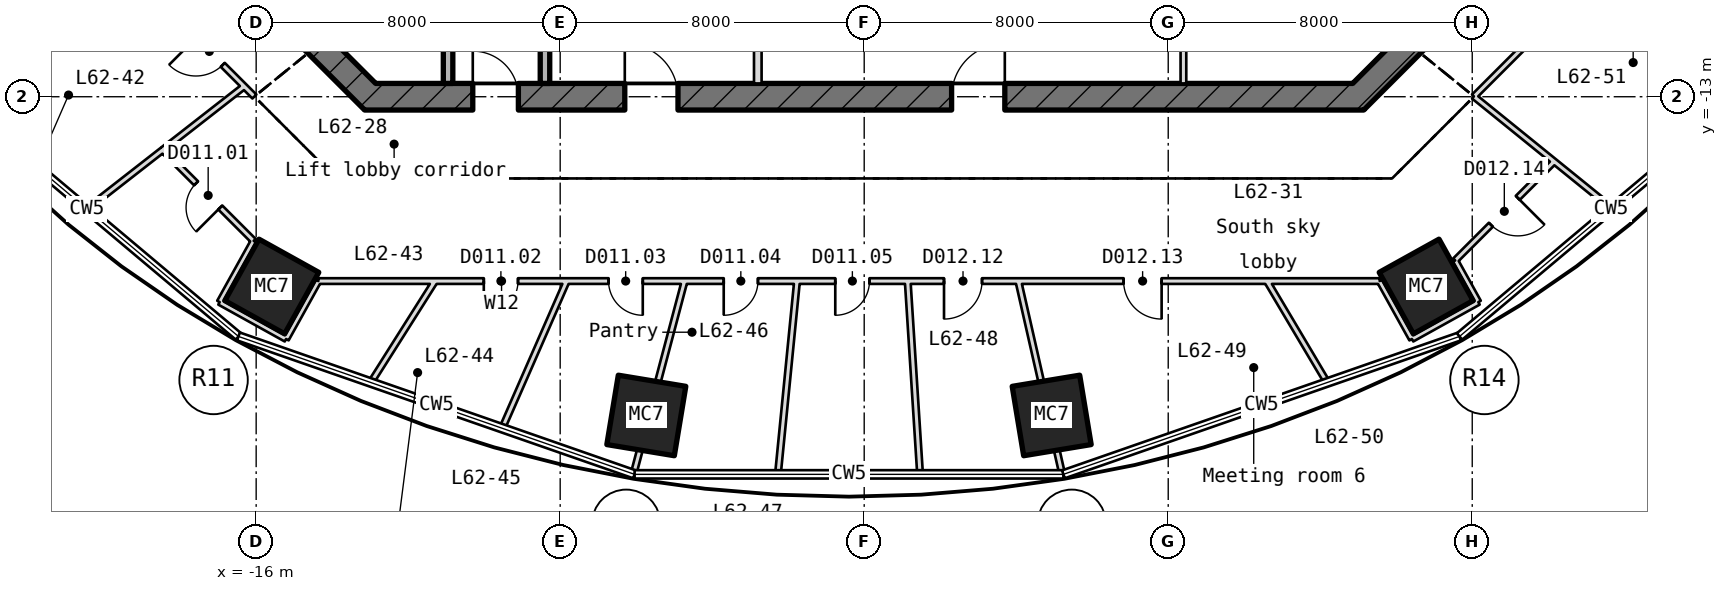
"""IFC4 building model, lengths in metres.
Left out: names, types, materials, properties, quantities, classifications, styles, units other than length and angle.
Written with IfcOpenShell. Run it as: python <this file> out.ifc"""

import sys

from ifc_helpers import new_model, si_unit, direction, frame, frame_2d, origin, origin_2d, place, context, subcontext, project, spatial, rectangle, hollow_rectangle, extrude, element, fill, save


model = new_model("IFC4")
c1 = context("Model", 3, precision=1e-05, world=origin(), true_north=direction((0.0, 1.0)))
c2 = subcontext(c1, "Body", "Model", "MODEL_VIEW")
j1 = project(units=[si_unit("LENGTHUNIT", "METRE"), si_unit("PLANEANGLEUNIT", "RADIAN")], contexts=[c1])
p1 = place(None, origin())
s1 = spatial("IfcSite", under=j1, at=p1, CompositionType="ELEMENT")
p2 = place(p1, origin())
s2 = spatial("IfcBuilding", under=s1, at=p2, CompositionType="ELEMENT")
p3 = place(p2, frame((0.0, 0.0, 279.1)))
s3 = spatial("IfcBuildingStorey", under=s2, at=p3, CompositionType="ELEMENT", Elevation=279.1)
for number, where, z_axis, x_axis in (
    (1, (-15.588, -17.993, -0.25), (0.0, 0.0, 1.0), (-0.874, 0.486, 0.0)),
    (2, (-5.733, -21.386, -0.25), (0.0, 0.0, 1.0), (-0.987, 0.163, 0.0)),
    (3, (4.933, -21.386, -0.25), (0.0, 0.0, 1.0), (-0.987, -0.163, 0.0)),
    (4, (14.788, -17.993, -0.25), (0.0, 0.0, 1.0), (-0.874, -0.486, 0.0)),
):
    element("IfcColumn", number, at=place(p3, frame(where, z_axis=z_axis, x_axis=x_axis)), inside=s3, PredefinedType="COLUMN", context=c2, shape_type="SweptSolid", body=[
        extrude(hollow_rectangle(XDim=1.8, YDim=1.85, WallThickness=0.06, at=origin_2d()), origin(), (0.0, 0.0, 1.0), 5.47),
    ])
for number, where, z_axis, x_axis in (
    (5, (12.897, -13.103, -0.25), (0.0, 0.0, 1.0), (0.707, 0.707, 0.0)),
    (6, (-16.103, -9.897, -0.25), (0.0, 0.0, 1.0), (0.707, -0.707, 0.0)),
):
    element("IfcWall", number, at=place(p3, frame(where, z_axis=z_axis, x_axis=x_axis)), inside=s3, PredefinedType="SHEAR", context=c2, shape_type="SweptSolid", body=[
        extrude(rectangle(XDim=4.533, YDim=0.7, at=frame_2d((2.266, 0.0))), origin(), (0.0, 0.0, 1.0), 5.47),
    ])
p4 = place(p3, frame((-13.145, -13.0, -0.25), z_axis=(0.0, 0.0, 1.0), x_axis=(1.0, 0.0, 0.0)))
e7 = element("IfcWall", 7, at=p4, inside=s3, PredefinedType="SHEAR", context=c2, shape_type="SweptSolid", body=[
    extrude(rectangle(XDim=26.29, YDim=0.7, at=frame_2d((13.145, 0.0))), origin(), (0.0, 0.0, 1.0), 5.47),
])
p5 = place(p4, frame((2.845, 0.0, 0.25)))
e8 = element("IfcOpeningElement", 8, at=p5, cuts=e7, PredefinedType="OPENING", context=c2, shape_type="SweptSolid", body=[
    extrude(rectangle(XDim=1.2, YDim=2.1, at=frame_2d((0.6, 1.05))), frame((0.0, 0.36, 0.0), z_axis=(0.0, -1.0, 0.0), x_axis=(1.0, 0.0, 0.0)), (0.0, 0.0, 1.0), 0.72),
])
p6 = place(p4, frame((6.845, 0.0, 0.25)))
e9 = element("IfcOpeningElement", 9, at=p6, cuts=e7, PredefinedType="OPENING", context=c2, shape_type="SweptSolid", body=[
    extrude(rectangle(XDim=1.4, YDim=2.1, at=frame_2d((0.7, 1.05))), frame((0.0, 0.36, 0.0), z_axis=(0.0, -1.0, 0.0), x_axis=(1.0, 0.0, 0.0)), (0.0, 0.0, 1.0), 0.72),
])
p7 = place(p4, frame((15.445, 0.0, 0.25)))
e10 = element("IfcOpeningElement", 10, at=p7, cuts=e7, PredefinedType="OPENING", context=c2, shape_type="SweptSolid", body=[
    extrude(rectangle(XDim=1.4, YDim=2.1, at=frame_2d((0.7, 1.05))), frame((0.0, 0.36, 0.0), z_axis=(0.0, -1.0, 0.0), x_axis=(1.0, 0.0, 0.0)), (0.0, 0.0, 1.0), 0.72),
])
p8 = place(p3, frame((-10.95, -12.65, 0.0), z_axis=(0.0, 0.0, 1.0), x_axis=(0.0, 1.0, 0.0)))
e11 = element("IfcWall", 11, at=p8, inside=s3, PredefinedType="STANDARD", context=c2, shape_type="SweptSolid", body=[
    extrude(rectangle(XDim=3.775, YDim=0.25, at=frame_2d((1.887, 0.0))), origin(), (0.0, 0.0, 1.0), 5.22),
])
p9 = place(p3, frame((-8.4, -12.65, 0.0), z_axis=(0.0, 0.0, 1.0), x_axis=(0.0, 1.0, 0.0)))
e12 = element("IfcWall", 12, at=p9, inside=s3, PredefinedType="STANDARD", context=c2, shape_type="SweptSolid", body=[
    extrude(rectangle(XDim=3.9, YDim=0.25, at=frame_2d((1.95, 0.0))), origin(), (0.0, 0.0, 1.0), 5.22),
])
p10 = place(p9, frame((1.55, 0.0, 0.0)))
e13 = element("IfcOpeningElement", 13, at=p10, cuts=e12, PredefinedType="OPENING", context=c2, shape_type="SweptSolid", body=[
    extrude(rectangle(XDim=1.1, YDim=2.1, at=frame_2d((0.55, 1.05))), frame((0.0, 0.135, 0.0), z_axis=(0.0, -1.0, 0.0), x_axis=(1.0, 0.0, 0.0)), (0.0, 0.0, 1.0), 0.27),
])
p11 = place(p3, frame((-2.8, -12.65, 0.0), z_axis=(0.0, 0.0, 1.0), x_axis=(0.0, 1.0, 0.0)))
e14 = element("IfcWall", 14, at=p11, inside=s3, PredefinedType="PARTITIONING", context=c2, shape_type="SweptSolid", body=[
    extrude(rectangle(XDim=4.19, YDim=0.2, at=frame_2d((2.095, 0.0))), origin(), (0.0, 0.0, 1.0), 5.22),
])
p12 = place(p3, frame((8.4, -12.65, 0.0), z_axis=(0.0, 0.0, 1.0), x_axis=(0.0, 1.0, 0.0)))
e15 = element("IfcWall", 15, at=p12, inside=s3, PredefinedType="PARTITIONING", context=c2, shape_type="SweptSolid", body=[
    extrude(rectangle(XDim=4.3, YDim=0.15, at=frame_2d((2.15, 0.0))), origin(), (0.0, 0.0, 1.0), 5.22),
])
p13 = place(p3, frame((-4.731, -17.85, 0.0), z_axis=(0.0, 0.0, 1.0), x_axis=(1.0, 0.0, 0.0)))
e16 = element("IfcWall", 16, at=p13, inside=s3, PredefinedType="PARTITIONING", context=c2, shape_type="SweptSolid", body=[
    extrude(rectangle(XDim=18.296, YDim=0.15, at=frame_2d((9.148, 0.0))), origin(), (0.0, 0.0, 1.0), 5.22),
])
p14 = place(p13, frame((1.035, 0.0, 0.0)))
e17 = element("IfcOpeningElement", 17, at=p14, cuts=e16, PredefinedType="OPENING", context=c2, shape_type="SweptSolid", body=[
    extrude(rectangle(XDim=0.9, YDim=2.1, at=frame_2d((0.45, 1.05))), frame((0.0, 0.085, 0.0), z_axis=(0.0, -1.0, 0.0), x_axis=(1.0, 0.0, 0.0)), (0.0, 0.0, 1.0), 0.17),
])
p15 = place(p13, frame((3.97, 0.0, 0.0)))
e18 = element("IfcOpeningElement", 18, at=p15, cuts=e16, PredefinedType="OPENING", context=c2, shape_type="SweptSolid", body=[
    extrude(rectangle(XDim=0.9, YDim=2.1, at=frame_2d((0.45, 1.05))), frame((0.0, 0.085, 0.0), z_axis=(0.0, -1.0, 0.0), x_axis=(1.0, 0.0, 0.0)), (0.0, 0.0, 1.0), 0.17),
])
p16 = place(p13, frame((6.831, 0.0, 0.0)))
e19 = element("IfcOpeningElement", 19, at=p16, cuts=e16, PredefinedType="OPENING", context=c2, shape_type="SweptSolid", body=[
    extrude(rectangle(XDim=1.0, YDim=2.1, at=frame_2d((0.5, 1.05))), frame((0.0, 0.085, 0.0), z_axis=(0.0, -1.0, 0.0), x_axis=(1.0, 0.0, 0.0)), (0.0, 0.0, 1.0), 0.17),
])
p17 = place(p13, frame((11.558, 0.0, 0.0)))
e20 = element("IfcOpeningElement", 20, at=p17, cuts=e16, PredefinedType="OPENING", context=c2, shape_type="SweptSolid", body=[
    extrude(rectangle(XDim=1.0, YDim=2.1, at=frame_2d((0.5, 1.05))), frame((0.0, 0.085, 0.0), z_axis=(0.0, -1.0, 0.0), x_axis=(1.0, 0.0, 0.0)), (0.0, 0.0, 1.0), 0.17),
])
p18 = place(p3, frame((-24.44, -12.566, 0.0), z_axis=(0.0, 0.0, 1.0), x_axis=(0.889344754937, 0.45723725446, 0.0)))
e21 = element("IfcWall", 21, at=p18, inside=s3, PredefinedType="PARTITIONING", context=c2, shape_type="SweptSolid", body=[
    extrude(rectangle(XDim=7.073, YDim=0.15, at=frame_2d((3.536, 0.0))), origin(), (0.0, 0.0, 1.0), 5.22),
])
p19 = place(p3, frame((14.412, -19.375, 0.0), z_axis=(0.0, 0.0, 1.0), x_axis=(0.874255143544, 0.485466727991, 0.0)))
e22 = element("IfcWall", 22, at=p19, inside=s3, PredefinedType="PARTITIONING", context=c2, shape_type="SweptSolid", body=[
    extrude(rectangle(XDim=2.0, YDim=0.15, at=frame_2d((1.0, 0.0))), origin(), (0.0, 0.0, 1.0), 5.22),
])
p20 = place(p3, frame((-18.46, -14.399, 0.0), z_axis=(0.0, 0.0, 1.0), x_axis=(0.788462265821, 0.615083128834, 0.0)))
e23 = element("IfcWall", 23, at=p20, inside=s3, PredefinedType="PARTITIONING", context=c2, shape_type="SweptSolid", body=[
    extrude(rectangle(XDim=2.72, YDim=0.15, at=frame_2d((1.36, 0.0))), origin(), (0.0, 0.0, 1.0), 5.22),
])
p21 = place(p3, frame((15.551, -17.308, 0.0), z_axis=(0.0, 0.0, 1.0), x_axis=(0.707106781187, 0.707106781187, 0.0)))
e24 = element("IfcWall", 24, at=p21, inside=s3, PredefinedType="PARTITIONING", context=c2, shape_type="SweptSolid", body=[
    extrude(rectangle(XDim=2.428, YDim=0.15, at=frame_2d((1.214, 0.0))), origin(), (0.0, 0.0, 1.0), 4.758),
])
p22 = place(p21, frame((1.328, 0.0, 0.0)))
e25 = element("IfcOpeningElement", 25, at=p22, cuts=e24, PredefinedType="OPENING", context=c2, shape_type="SweptSolid", body=[
    extrude(rectangle(XDim=1.0, YDim=2.1, at=frame_2d((0.5, 1.05))), frame((0.0, 0.085, 0.0), z_axis=(0.0, -1.0, 0.0), x_axis=(1.0, 0.0, 0.0)), (0.0, 0.0, 1.0), 0.17),
])
p23 = place(p3, frame((17.268, -15.591, 0.0), z_axis=(0.0, 0.0, 1.0), x_axis=(0.707106781187, 0.707106781187, 0.0)))
e26 = element("IfcWall", 26, at=p23, inside=s3, PredefinedType="PARTITIONING", context=c2, shape_type="SweptSolid", body=[
    extrude(rectangle(XDim=1.228, YDim=0.15, at=frame_2d((0.614, 0.0))), origin(), (0.0, 0.0, 1.0), 5.22),
])
p24 = place(p3, frame((16.046, -12.994, 0.0), z_axis=(0.0, 0.0, 1.0), x_axis=(0.707106781187, 0.707106781187, 0.0)))
e27 = element("IfcWall", 27, at=p24, inside=s3, PredefinedType="PARTITIONING", context=c2, shape_type="SweptSolid", body=[
    extrude(rectangle(XDim=2.975, YDim=0.15, at=frame_2d((1.487, 0.0))), origin(), (0.0, 0.0, 1.0), 5.22),
])
p25 = place(p3, frame((-2.269, -22.916, 0.0), z_axis=(0.0, 0.0, 1.0), x_axis=(0.0985065146, 0.995136406017, 0.0)))
e28 = element("IfcWall", 28, at=p25, inside=s3, PredefinedType="PARTITIONING", context=c2, shape_type="SweptSolid", body=[
    extrude(rectangle(XDim=5.091, YDim=0.15, at=frame_2d((2.545, 0.0))), origin(), (0.0, 0.0, 1.0), 5.22),
])
p26 = place(p3, frame((1.469, -22.916, 0.0), z_axis=(0.0, 0.0, 1.0), x_axis=(-0.064013021846, 0.997949063346, 0.0)))
e29 = element("IfcWall", 29, at=p26, inside=s3, PredefinedType="PARTITIONING", context=c2, shape_type="SweptSolid", body=[
    extrude(rectangle(XDim=5.076, YDim=0.15, at=frame_2d((2.538, 0.0))), origin(), (0.0, 0.0, 1.0), 5.22),
])
p27 = place(p3, frame((5.207, -22.916, 0.0), z_axis=(0.0, 0.0, 1.0), x_axis=(-0.221605104311, 0.975136491853, 0.0)))
e30 = element("IfcWall", 30, at=p27, inside=s3, PredefinedType="PARTITIONING", context=c2, shape_type="SweptSolid", body=[
    extrude(rectangle(XDim=1.979, YDim=0.15, at=frame_2d((0.989, 0.0))), origin(), (0.0, 0.0, 1.0), 5.22),
])
p28 = place(p3, frame((4.769, -20.987, 0.0), z_axis=(0.0, 0.0, 1.0), x_axis=(-0.221565330544, 0.975145529806, 0.0)))
e31 = element("IfcWall", 31, at=p28, inside=s3, PredefinedType="PARTITIONING", context=c2, shape_type="SweptSolid", body=[
    extrude(rectangle(XDim=3.216, YDim=0.15, at=frame_2d((1.608, 0.0))), origin(), (0.0, 0.0, 1.0), 4.803),
])
p29 = place(p3, frame((16.16, -18.404, 0.0), z_axis=(0.0, 0.0, 1.0), x_axis=(-0.485576805941, 0.874194009092, 0.0)))
e32 = element("IfcWall", 32, at=p29, inside=s3, PredefinedType="PARTITIONING", context=c2, shape_type="SweptSolid", body=[
    extrude(rectangle(XDim=1.254, YDim=0.15, at=frame_2d((0.627, 0.0))), origin(), (0.0, 0.0, 1.0), 5.22),
])
p30 = place(p3, frame((14.412, -19.375, 0.0), z_axis=(0.0, 0.0, 1.0), x_axis=(-0.485535973732, 0.874216688363, 0.0)))
e33 = element("IfcWall", 33, at=p30, inside=s3, PredefinedType="PARTITIONING", context=c2, shape_type="SweptSolid", body=[
    extrude(rectangle(XDim=1.744, YDim=0.15, at=frame_2d((0.872, 0.0))), origin(), (0.0, 0.0, 1.0), 5.22),
])
p31 = place(p3, frame((12.171, -20.502, 0.0), z_axis=(0.0, 0.0, 1.0), x_axis=(-0.510509494535, 0.859872116067, 0.0)))
e34 = element("IfcWall", 34, at=p31, inside=s3, PredefinedType="PARTITIONING", context=c2, shape_type="SweptSolid", body=[
    extrude(rectangle(XDim=3.084, YDim=0.15, at=frame_2d((1.542, 0.0))), origin(), (0.0, 0.0, 1.0), 5.22),
])
p32 = place(p3, frame((-16.046, -12.994, 0.0), z_axis=(0.0, 0.0, 1.0), x_axis=(-0.707106781187, 0.707106781187, 0.0)))
e35 = element("IfcWall", 35, at=p32, inside=s3, PredefinedType="PARTITIONING", context=c2, shape_type="SweptSolid", body=[
    extrude(rectangle(XDim=2.975, YDim=0.15, at=frame_2d((1.487, 0.0))), origin(), (0.0, 0.0, 1.0), 5.22),
])
p33 = place(p32, frame((1.177, 0.0, 0.0)))
e36 = element("IfcOpeningElement", 36, at=p33, cuts=e35, PredefinedType="OPENING", context=c2, shape_type="SweptSolid", body=[
    extrude(rectangle(XDim=1.0, YDim=2.1, at=frame_2d((0.5, 1.05))), frame((0.0, 0.085, 0.0), z_axis=(0.0, -1.0, 0.0), x_axis=(1.0, 0.0, 0.0)), (0.0, 0.0, 1.0), 0.17),
])
p34 = place(p3, frame((19.658, -15.919, 0.0), z_axis=(0.0, 0.0, 1.0), x_axis=(-0.777148316215, 0.629317483155, 0.0)))
e37 = element("IfcWall", 37, at=p34, inside=s3, PredefinedType="PARTITIONING", context=c2, shape_type="SweptSolid", body=[
    extrude(rectangle(XDim=4.652, YDim=0.15, at=frame_2d((2.326, 0.0))), origin(), (0.0, 0.0, 1.0), 5.22),
])
p35 = place(p3, frame((-14.365, -17.85, 0.0), z_axis=(0.0, 0.0, 1.0), x_axis=(1.0, 0.0, 0.0)))
e38 = element("IfcWall", 38, at=p35, inside=s3, PredefinedType="PARTITIONING", context=c2, shape_type="SweptSolid", body=[
    extrude(rectangle(XDim=9.644, YDim=0.15, at=frame_2d((4.822, 0.0))), origin(), (0.0, 0.0, 1.0), 5.22),
])
p36 = place(p35, frame((4.354, 0.0, 0.0)))
e39 = element("IfcOpeningElement", 39, at=p36, cuts=e38, PredefinedType="OPENING", context=c2, shape_type="SweptSolid", body=[
    extrude(rectangle(XDim=0.9, YDim=2.1, at=frame_2d((0.45, 1.05))), frame((0.0, 0.085, 0.0), z_axis=(0.0, -1.0, 0.0), x_axis=(1.0, 0.0, 0.0)), (0.0, 0.0, 1.0), 0.17),
])
p37 = place(p35, frame((7.638, 0.0, 0.0)))
e40 = element("IfcOpeningElement", 40, at=p37, cuts=e38, PredefinedType="OPENING", context=c2, shape_type="SweptSolid", body=[
    extrude(rectangle(XDim=0.9, YDim=2.1, at=frame_2d((0.45, 1.05))), frame((0.0, 0.085, 0.0), z_axis=(0.0, -1.0, 0.0), x_axis=(1.0, 0.0, 0.0)), (0.0, 0.0, 1.0), 0.17),
])
p38 = place(p3, frame((-20.439, -15.942, 0.0), z_axis=(0.0, 0.0, 1.0), x_axis=(0.788556920003, 0.614961774353, 0.0)))
e41 = element("IfcWall", 41, at=p38, inside=s3, PredefinedType="PARTITIONING", context=c2, shape_type="SweptSolid", body=[
    extrude(rectangle(XDim=2.515, YDim=0.15, at=frame_2d((1.257, 0.0))), origin(), (0.0, 0.0, 1.0), 5.22),
])
p39 = place(p3, frame((-12.971, -20.503, 0.0), z_axis=(0.0, 0.0, 1.0), x_axis=(0.534654182203, 0.845070946994, 0.0)))
e42 = element("IfcWall", 42, at=p39, inside=s3, PredefinedType="PARTITIONING", context=c2, shape_type="SweptSolid", body=[
    extrude(rectangle(XDim=3.139, YDim=0.15, at=frame_2d((1.569, 0.0))), origin(), (0.0, 0.0, 1.0), 5.22),
])
p40 = place(p3, frame((-15.212, -19.375, 0.0), z_axis=(0.0, 0.0, 1.0), x_axis=(0.485642931179, 0.874157276122, 0.0)))
e43 = element("IfcWall", 43, at=p40, inside=s3, PredefinedType="PARTITIONING", context=c2, shape_type="SweptSolid", body=[
    extrude(rectangle(XDim=1.744, YDim=0.15, at=frame_2d((0.872, 0.0))), origin(), (0.0, 0.0, 1.0), 5.22),
])
p41 = place(p3, frame((-16.96, -18.404, 0.0), z_axis=(0.0, 0.0, 1.0), x_axis=(0.48554166506, 0.874213527401, 0.0)))
e44 = element("IfcWall", 44, at=p41, inside=s3, PredefinedType="PARTITIONING", context=c2, shape_type="SweptSolid", body=[
    extrude(rectangle(XDim=1.842, YDim=0.15, at=frame_2d((0.921, 0.0))), origin(), (0.0, 0.0, 1.0), 5.22),
])
p42 = place(p3, frame((-9.518, -21.705, 0.0), z_axis=(0.0, 0.0, 1.0), x_axis=(0.401634183829, 0.915800186929, 0.0)))
e45 = element("IfcWall", 45, at=p42, inside=s3, PredefinedType="PARTITIONING", context=c2, shape_type="SweptSolid", body=[
    extrude(rectangle(XDim=4.209, YDim=0.15, at=frame_2d((2.104, 0.0))), origin(), (0.0, 0.0, 1.0), 5.22),
])
p43 = place(p3, frame((-6.065, -22.907, 0.0), z_axis=(0.0, 0.0, 1.0), x_axis=(0.255862116083, 0.966713286116, 0.0)))
e46 = element("IfcWall", 46, at=p43, inside=s3, PredefinedType="PARTITIONING", context=c2, shape_type="SweptSolid", body=[
    extrude(rectangle(XDim=1.984, YDim=0.15, at=frame_2d((0.992, 0.0))), origin(), (0.0, 0.0, 1.0), 5.22),
])
p44 = place(p3, frame((-5.557, -20.989, 0.0), z_axis=(0.0, 0.0, 1.0), x_axis=(0.255940091978, 0.966692644701, 0.0)))
e47 = element("IfcWall", 47, at=p44, inside=s3, PredefinedType="PARTITIONING", context=c2, shape_type="SweptSolid", body=[
    extrude(rectangle(XDim=3.247, YDim=0.15, at=frame_2d((1.624, 0.0))), origin(), (0.0, 0.0, 1.0), 4.803),
])
p45 = place(p3, frame((-16.066, -16.793, 0.0), z_axis=(0.0, 0.0, 1.0), x_axis=(-0.707070734655, 0.70714282588, 0.0)))
e48 = element("IfcWall", 48, at=p45, inside=s3, PredefinedType="PARTITIONING", context=c2, shape_type="SweptSolid", body=[
    extrude(rectangle(XDim=3.386, YDim=0.15, at=frame_2d((1.693, 0.0))), origin(), (0.0, 0.0, 1.0), 5.22),
])
p46 = place(p45, frame((1.243, 0.0, 0.0)))
e49 = element("IfcOpeningElement", 49, at=p46, cuts=e48, PredefinedType="OPENING", context=c2, shape_type="SweptSolid", body=[
    extrude(rectangle(XDim=0.9, YDim=2.1, at=frame_2d((0.45, 1.05))), frame((0.0, 0.085, 0.0), z_axis=(0.0, -1.0, 0.0), x_axis=(1.0, 0.0, 0.0)), (0.0, 0.0, 1.0), 0.17),
])
p47 = place(p3, frame((-15.212, -19.375, 0.0), z_axis=(0.0, 0.0, 1.0), x_axis=(-0.874255143544, 0.485466727991, 0.0)))
e50 = element("IfcWall", 50, at=p47, inside=s3, PredefinedType="PARTITIONING", context=c2, shape_type="SweptSolid", body=[
    extrude(rectangle(XDim=2.0, YDim=0.15, at=frame_2d((1.0, 0.0))), origin(), (0.0, 0.0, 1.0), 5.22),
])
p48 = place(p5, origin())
e51 = element("IfcDoor", 51, at=p48, inside=s3, OperationType="SINGLE_SWING_RIGHT", PredefinedType="DOOR", context=c2, shape_type="SweptSolid", body=[
    extrude(rectangle(XDim=1.2, YDim=2.1, at=frame_2d((0.6, 1.05))), frame((0.0, 0.025, 0.0), z_axis=(0.0, -1.0, 0.0), x_axis=(1.0, 0.0, 0.0)), (0.0, 0.0, 1.0), 0.05),
])
fill(e8, e51)
p49 = place(p6, origin())
e52 = element("IfcDoor", 52, at=p49, inside=s3, OperationType="SINGLE_SWING_RIGHT", PredefinedType="DOOR", context=c2, shape_type="SweptSolid", body=[
    extrude(rectangle(XDim=1.4, YDim=2.1, at=frame_2d((0.7, 1.05))), frame((0.0, 0.025, 0.0), z_axis=(0.0, -1.0, 0.0), x_axis=(1.0, 0.0, 0.0)), (0.0, 0.0, 1.0), 0.05),
])
fill(e9, e52)
p50 = place(p7, origin())
e53 = element("IfcDoor", 53, at=p50, inside=s3, OperationType="SINGLE_SWING_RIGHT", PredefinedType="DOOR", context=c2, shape_type="SweptSolid", body=[
    extrude(rectangle(XDim=1.4, YDim=2.1, at=frame_2d((0.7, 1.05))), frame((0.0, 0.025, 0.0), z_axis=(0.0, -1.0, 0.0), x_axis=(1.0, 0.0, 0.0)), (0.0, 0.0, 1.0), 0.05),
])
fill(e10, e53)
p51 = place(p33, origin())
e54 = element("IfcDoor", 54, at=p51, inside=s3, OperationType="SINGLE_SWING_RIGHT", PredefinedType="DOOR", context=c2, shape_type="SweptSolid", body=[
    extrude(rectangle(XDim=1.0, YDim=2.1, at=frame_2d((0.5, 1.05))), frame((0.0, 0.025, 0.0), z_axis=(0.0, -1.0, 0.0), x_axis=(1.0, 0.0, 0.0)), (0.0, 0.0, 1.0), 0.05),
])
fill(e36, e54)
p52 = place(p46, origin())
e55 = element("IfcDoor", 55, at=p52, inside=s3, OperationType="SINGLE_SWING_RIGHT", PredefinedType="DOOR", context=c2, shape_type="SweptSolid", body=[
    extrude(rectangle(XDim=0.9, YDim=2.1, at=frame_2d((0.45, 1.05))), frame((0.0, 0.025, 0.0), z_axis=(0.0, -1.0, 0.0), x_axis=(1.0, 0.0, 0.0)), (0.0, 0.0, 1.0), 0.05),
])
fill(e49, e55)
p53 = place(p36, frame((0.9, 0.0, 0.0), z_axis=(0.0, 0.0, 1.0), x_axis=(-1.0, 0.0, 0.0)))
e56 = element("IfcDoor", 56, at=p53, inside=s3, OperationType="SINGLE_SWING_LEFT", PredefinedType="DOOR", context=c2, shape_type="SweptSolid", body=[
    extrude(rectangle(XDim=0.9, YDim=2.1, at=frame_2d((0.45, 1.05))), frame((0.0, 0.025, 0.0), z_axis=(0.0, -1.0, 0.0), x_axis=(1.0, 0.0, 0.0)), (0.0, 0.0, 1.0), 0.05),
])
fill(e39, e56)
p54 = place(p37, frame((0.9, 0.0, 0.0), z_axis=(0.0, 0.0, 1.0), x_axis=(-1.0, 0.0, 0.0)))
e57 = element("IfcDoor", 57, at=p54, inside=s3, OperationType="SINGLE_SWING_LEFT", PredefinedType="DOOR", context=c2, shape_type="SweptSolid", body=[
    extrude(rectangle(XDim=0.9, YDim=2.1, at=frame_2d((0.45, 1.05))), frame((0.0, 0.025, 0.0), z_axis=(0.0, -1.0, 0.0), x_axis=(1.0, 0.0, 0.0)), (0.0, 0.0, 1.0), 0.05),
])
fill(e40, e57)
p55 = place(p14, frame((0.9, 0.0, 0.0), z_axis=(0.0, 0.0, 1.0), x_axis=(-1.0, 0.0, 0.0)))
e58 = element("IfcDoor", 58, at=p55, inside=s3, OperationType="SINGLE_SWING_LEFT", PredefinedType="DOOR", context=c2, shape_type="SweptSolid", body=[
    extrude(rectangle(XDim=0.9, YDim=2.1, at=frame_2d((0.45, 1.05))), frame((0.0, 0.025, 0.0), z_axis=(0.0, -1.0, 0.0), x_axis=(1.0, 0.0, 0.0)), (0.0, 0.0, 1.0), 0.05),
])
fill(e17, e58)
p56 = place(p15, frame((0.9, 0.0, 0.0), z_axis=(0.0, 0.0, 1.0), x_axis=(-1.0, 0.0, 0.0)))
e59 = element("IfcDoor", 59, at=p56, inside=s3, OperationType="SINGLE_SWING_LEFT", PredefinedType="DOOR", context=c2, shape_type="SweptSolid", body=[
    extrude(rectangle(XDim=0.9, YDim=2.1, at=frame_2d((0.45, 1.05))), frame((0.0, 0.025, 0.0), z_axis=(0.0, -1.0, 0.0), x_axis=(1.0, 0.0, 0.0)), (0.0, 0.0, 1.0), 0.05),
])
fill(e18, e59)
p57 = place(p16, frame((1.0, 0.0, 0.0), z_axis=(0.0, 0.0, 1.0), x_axis=(-1.0, 0.0, 0.0)))
e60 = element("IfcDoor", 60, at=p57, inside=s3, OperationType="SINGLE_SWING_LEFT", PredefinedType="DOOR", context=c2, shape_type="SweptSolid", body=[
    extrude(rectangle(XDim=1.0, YDim=2.1, at=frame_2d((0.5, 1.05))), frame((0.0, 0.025, 0.0), z_axis=(0.0, -1.0, 0.0), x_axis=(1.0, 0.0, 0.0)), (0.0, 0.0, 1.0), 0.05),
])
fill(e19, e60)
p58 = place(p17, frame((1.0, 0.0, 0.0), z_axis=(0.0, 0.0, 1.0), x_axis=(-1.0, 0.0, 0.0)))
e61 = element("IfcDoor", 61, at=p58, inside=s3, OperationType="SINGLE_SWING_LEFT", PredefinedType="DOOR", context=c2, shape_type="SweptSolid", body=[
    extrude(rectangle(XDim=1.0, YDim=2.1, at=frame_2d((0.5, 1.05))), frame((0.0, 0.025, 0.0), z_axis=(0.0, -1.0, 0.0), x_axis=(1.0, 0.0, 0.0)), (0.0, 0.0, 1.0), 0.05),
])
fill(e20, e61)
p59 = place(p22, frame((1.0, 0.0, 0.0), z_axis=(0.0, 0.0, 1.0), x_axis=(-1.0, 0.0, 0.0)))
e62 = element("IfcDoor", 62, at=p59, inside=s3, OperationType="SINGLE_SWING_LEFT", PredefinedType="DOOR", context=c2, shape_type="SweptSolid", body=[
    extrude(rectangle(XDim=1.0, YDim=2.1, at=frame_2d((0.5, 1.05))), frame((0.0, 0.025, 0.0), z_axis=(0.0, -1.0, 0.0), x_axis=(1.0, 0.0, 0.0)), (0.0, 0.0, 1.0), 0.05),
])
fill(e25, e62)
save(model, sys.argv[1])
